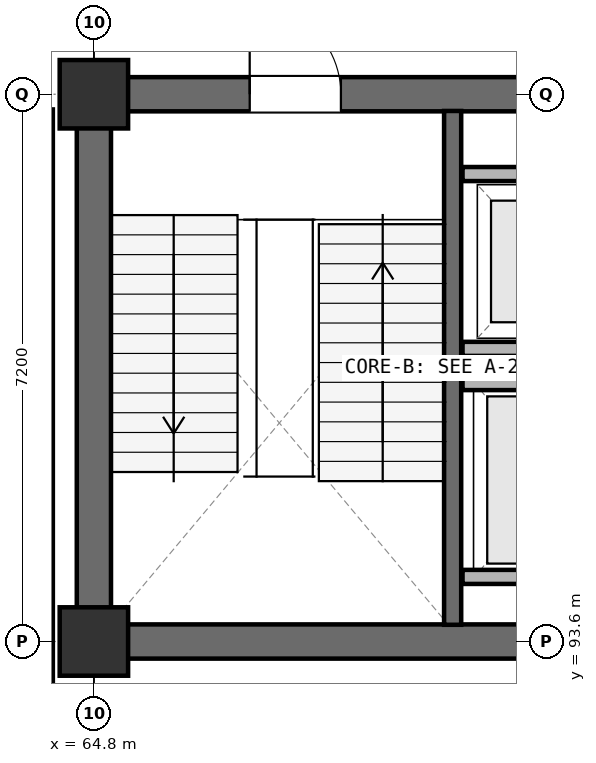
"""IFC4 building model, lengths in metres.
Left out: names, types, materials, properties, quantities, classifications, styles, units other than length and angle.
Written with IfcOpenShell. Run it as: python <this file> out.ifc"""

import sys

from ifc_helpers import new_model, si_unit, direction, frame, frame_2d, origin, origin_2d, place, context, subcontext, project, spatial, rectangle, extrude, element, fill, save


model = new_model("IFC4")
c1 = context("Model", 3, precision=1e-05, world=origin(), true_north=direction((0.0, 1.0)))
c2 = subcontext(c1, "Body", "Model", "MODEL_VIEW")
j1 = project(units=[si_unit("LENGTHUNIT", "METRE"), si_unit("PLANEANGLEUNIT", "RADIAN")], contexts=[c1])
p1 = place(None, origin())
s1 = spatial("IfcSite", under=j1, at=p1, CompositionType="ELEMENT")
p2 = place(p1, origin())
s2 = spatial("IfcBuilding", under=s1, at=p2, CompositionType="ELEMENT")
p3 = place(p2, frame((0.0, 0.0, 5.4)))
s3 = spatial("IfcBuildingStorey", under=s2, at=p3, CompositionType="ELEMENT", Elevation=5.4)
for number, where, z_axis, x_axis in (
    (1, (64.8, 93.6, 0.0), (0.0, 0.0, 1.0), (1.0, 0.0, 0.0)),
    (2, (64.8, 100.8, 0.0), (0.0, 0.0, 1.0), (1.0, 0.0, 0.0)),
):
    element("IfcColumn", number, at=place(p3, frame(where, z_axis=z_axis, x_axis=x_axis)), inside=s3, PredefinedType="COLUMN", context=c2, shape_type="SweptSolid", body=[
        extrude(rectangle(XDim=0.9, YDim=0.9, at=origin_2d()), origin(), (0.0, 0.0, 1.0), 4.8),
    ])
p4 = place(p3, frame((65.15, 93.6, 0.0), z_axis=(0.0, 0.0, 1.0), x_axis=(1.0, 0.0, 0.0)))
e3 = element("IfcWall", 3, at=p4, inside=s3, PredefinedType="SHEAR", context=c2, shape_type="SweptSolid", body=[
    extrude(rectangle(XDim=6.5, YDim=0.45, at=frame_2d((3.25, 0.0))), origin(), (0.0, 0.0, 1.0), 4.8),
])
p5 = place(p3, frame((71.65, 100.8, 0.0), z_axis=(0.0, 0.0, 1.0), x_axis=(-1.0, 0.0, 0.0)))
e4 = element("IfcWall", 4, at=p5, inside=s3, PredefinedType="SHEAR", context=c2, shape_type="SweptSolid", body=[
    extrude(rectangle(XDim=6.5, YDim=0.45, at=frame_2d((3.25, 0.0))), origin(), (0.0, 0.0, 1.0), 4.8),
])
p6 = place(p5, frame((3.6, 0.0, 0.0)))
e5 = element("IfcOpeningElement", 5, at=p6, cuts=e4, PredefinedType="OPENING", context=c2, shape_type="SweptSolid", body=[
    extrude(rectangle(XDim=1.2, YDim=2.2, at=frame_2d((0.6, 1.1))), frame((0.0, 0.235, 0.0), z_axis=(0.0, -1.0, 0.0), x_axis=(1.0, 0.0, 0.0)), (0.0, 0.0, 1.0), 0.47),
])
p7 = place(p3, frame((64.8, 100.45, 0.0), z_axis=(0.0, 0.0, 1.0), x_axis=(0.0, -1.0, 0.0)))
e6 = element("IfcWall", 6, at=p7, inside=s3, PredefinedType="SHEAR", context=c2, shape_type="SweptSolid", body=[
    extrude(rectangle(XDim=6.5, YDim=0.45, at=frame_2d((3.25, 0.0))), origin(), (0.0, 0.0, 1.0), 4.8),
])
p8 = place(p3, frame((69.52, 93.82, 0.0), z_axis=(0.0, 0.0, 1.0), x_axis=(0.0, 1.0, 0.0)))
e7 = element("IfcWall", 7, at=p8, inside=s3, PredefinedType="SHEAR", context=c2, shape_type="SweptSolid", body=[
    extrude(rectangle(XDim=6.76, YDim=0.225, at=frame_2d((3.38, 0.0))), origin(), (0.0, 0.0, 1.0), 4.8),
])
for number, where, z_axis, x_axis in (
    (8, (69.65, 94.45, 0.0), (0.0, 0.0, 1.0), (1.0, 0.0, 0.0)),
    (9, (69.65, 97.0, 0.0), (0.0, 0.0, 1.0), (1.0, 0.0, 0.0)),
    (10, (69.65, 97.45, 0.0), (0.0, 0.0, 1.0), (1.0, 0.0, 0.0)),
    (11, (69.65, 99.75, 0.0), (0.0, 0.0, 1.0), (1.0, 0.0, 0.0)),
):
    element("IfcWall", number, at=place(p3, frame(where, z_axis=z_axis, x_axis=x_axis)), inside=s3, PredefinedType="PARTITIONING", context=c2, shape_type="SweptSolid", body=[
        extrude(rectangle(XDim=2.1, YDim=0.185, at=frame_2d((1.05, 0.0))), origin(), (0.0, 0.0, 1.0), 4.8),
    ])
p9 = place(p3, frame((64.2, 100.6, 0.0), z_axis=(0.0, 0.0, 1.0), x_axis=(0.0, -1.0, 0.0)))
e12 = element("IfcWall", 12, at=p9, inside=s3, PredefinedType="PARTITIONING", context=c2, shape_type="SweptSolid", body=[
    extrude(rectangle(XDim=13.4, YDim=0.12, at=frame_2d((6.7, 0.0))), origin(), (0.0, 0.0, 1.0), 3.52),
])
p10 = place(p6, frame((1.2, 0.0, 0.0), z_axis=(0.0, 0.0, 1.0), x_axis=(-1.0, 0.0, 0.0)))
e13 = element("IfcDoor", 13, at=p10, inside=s3, OperationType="SINGLE_SWING_LEFT", PredefinedType="DOOR", context=c2, shape_type="SweptSolid", body=[
    extrude(rectangle(XDim=1.2, YDim=2.2, at=frame_2d((0.6, 1.1))), frame((0.0, 0.025, 0.0), z_axis=(0.0, -1.0, 0.0), x_axis=(1.0, 0.0, 0.0)), (0.0, 0.0, 1.0), 0.05),
])
fill(e5, e13)
save(model, sys.argv[1])
